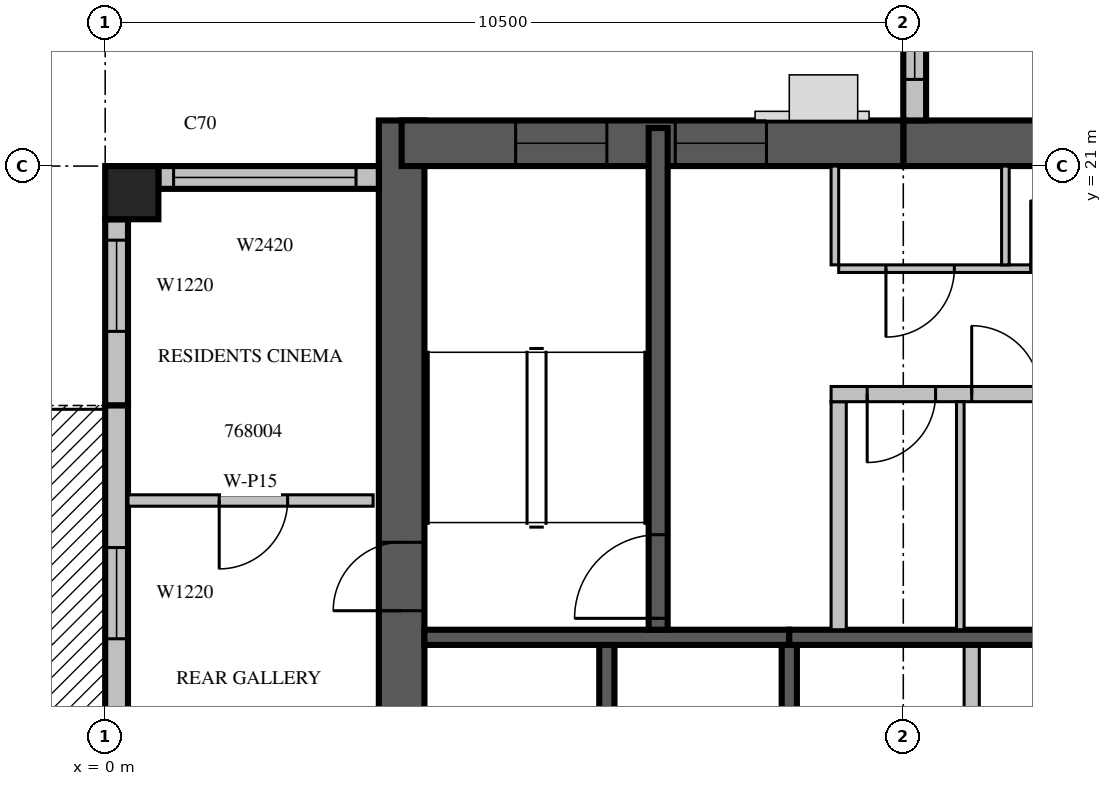
"""IFC4 building model, lengths in metres.
Left out: names, types, materials, properties, quantities, classifications, styles, units other than length and angle.
Written with IfcOpenShell. Run it as: python <this file> out.ifc"""

import sys

from ifc_helpers import new_model, si_unit, direction, frame, frame_2d, origin, origin_2d, place, context, subcontext, project, spatial, rectangle, extrude, source, transform, mapped, element, fill, save


model = new_model("IFC4")
c1 = context("Model", 3, precision=1e-05, world=origin(), true_north=direction((0.0, 1.0)))
c2 = subcontext(c1, "Body", "Model", "MODEL_VIEW")
j1 = project(units=[si_unit("LENGTHUNIT", "METRE"), si_unit("PLANEANGLEUNIT", "RADIAN")], contexts=[c1])
p1 = place(None, origin())
s1 = spatial("IfcSite", under=j1, at=p1, CompositionType="ELEMENT")
p2 = place(p1, origin())
s2 = spatial("IfcBuilding", under=s1, at=p2, CompositionType="ELEMENT")
p3 = place(p2, frame((0.0, 0.0, 298.5)))
s3 = spatial("IfcBuildingStorey", under=s2, at=p3, CompositionType="ELEMENT", Elevation=298.5)
m1 = source(origin(), c2, "Body", "SweptSolid", [
    extrude(rectangle(XDim=0.7, YDim=0.7, at=origin_2d()), origin(), (0.0, 0.0, 1.0), 3.5),
])
p4 = place(p3, frame((0.35, 20.65, 0.0), z_axis=(0.0, 0.0, 1.0), x_axis=(1.0, 0.0, 0.0)))
e1 = element("IfcColumn", 1, at=p4, inside=s3, PredefinedType="COLUMN", context=c2, shape_type="MappedRepresentation", body=[
    mapped(m1, transform((0.0, 0.0, 0.0), scale=1.0)),
])
m2 = source(origin(), c2, "Body", "SweptSolid", [
    extrude(rectangle(XDim=17.4, YDim=0.6, at=frame_2d((8.7, 0.0))), origin(), (0.0, 0.0, 1.0), 3.5),
])
p5 = place(p3, frame((3.9, 4.2, 0.0), z_axis=(0.0, 0.0, 1.0), x_axis=(0.0, 1.0, 0.0)))
e2 = element("IfcWall", 2, at=p5, inside=s3, PredefinedType="SHEAR", context=c2, shape_type="MappedRepresentation", body=[
    mapped(m2, transform((0.0, 0.0, 0.0), scale=1.0)),
])
m3 = source(origin(), c2, "Body", "SweptSolid", [
    extrude(rectangle(XDim=2.2, YDim=2.1, at=frame_2d((1.1, 1.05))), frame((0.0, 0.31, 0.0), z_axis=(0.0, -1.0, 0.0), x_axis=(1.0, 0.0, 0.0)), (0.0, 0.0, 1.0), 0.62),
])
p6 = place(p5, frame((4.2, 0.0, 0.0)))
e3 = element("IfcOpeningElement", 3, at=p6, cuts=e2, PredefinedType="OPENING", context=c2, shape_type="MappedRepresentation", body=[
    mapped(m3, transform((0.0, 0.0, 0.0), scale=1.0)),
])
m4 = source(origin(), c2, "Body", "SweptSolid", [
    extrude(rectangle(XDim=0.9, YDim=2.1, at=frame_2d((0.45, 1.05))), frame((0.0, 0.31, 0.0), z_axis=(0.0, -1.0, 0.0), x_axis=(1.0, 0.0, 0.0)), (0.0, 0.0, 1.0), 0.62),
])
p7 = place(p5, frame((10.95, 0.0, 0.0)))
e4 = element("IfcOpeningElement", 4, at=p7, cuts=e2, PredefinedType="OPENING", context=c2, shape_type="MappedRepresentation", body=[
    mapped(m4, transform((0.0, 0.0, 0.0), scale=1.0)),
])
m5 = source(origin(), c2, "Body", "SweptSolid", [
    extrude(rectangle(XDim=11.1, YDim=0.6, at=frame_2d((5.55, 0.0))), origin(), (0.0, 0.0, 1.0), 3.5),
])
p8 = place(p3, frame((10.5, 21.3, 0.0), z_axis=(0.0, 0.0, 1.0), x_axis=(1.0, 0.0, 0.0)))
e5 = element("IfcWall", 5, at=p8, inside=s3, PredefinedType="SHEAR", context=c2, shape_type="MappedRepresentation", body=[
    mapped(m5, transform((0.0, 0.0, 0.0), scale=1.0)),
])
m6 = source(origin(), c2, "Body", "SweptSolid", [
    extrude(rectangle(XDim=1.2, YDim=2.1, at=frame_2d((0.6, 1.05))), frame((0.0, 0.31, 0.0), z_axis=(0.0, -1.0, 0.0), x_axis=(1.0, 0.0, 0.0)), (0.0, 0.0, 1.0), 0.62),
])
p9 = place(p8, frame((8.7, 0.0, 0.0)))
e6 = element("IfcOpeningElement", 6, at=p9, cuts=e5, PredefinedType="OPENING", context=c2, shape_type="MappedRepresentation", body=[
    mapped(m6, transform((0.0, 0.0, 0.0), scale=1.0)),
])
m7 = source(origin(), c2, "Body", "SweptSolid", [
    extrude(rectangle(XDim=6.6, YDim=0.6, at=frame_2d((3.3, 0.0))), origin(), (0.0, 0.0, 1.0), 3.5),
])
p10 = place(p3, frame((3.9, 21.3, 0.0), z_axis=(0.0, 0.0, 1.0), x_axis=(1.0, 0.0, 0.0)))
e7 = element("IfcWall", 7, at=p10, inside=s3, PredefinedType="SHEAR", context=c2, shape_type="MappedRepresentation", body=[
    mapped(m7, transform((0.0, 0.0, 0.0), scale=1.0)),
])
m8 = source(origin(), c2, "Body", "SweptSolid", [
    extrude(rectangle(XDim=1.2, YDim=2.4, at=frame_2d((0.6, 1.2))), frame((0.0, 0.31, 0.0), z_axis=(0.0, -1.0, 0.0), x_axis=(1.0, 0.0, 0.0)), (0.0, 0.0, 1.0), 0.62),
])
p11 = place(p10, frame((1.5, 0.0, 0.6)))
e8 = element("IfcOpeningElement", 8, at=p11, cuts=e7, PredefinedType="OPENING", context=c2, shape_type="MappedRepresentation", body=[
    mapped(m8, transform((0.0, 0.0, 0.0), scale=1.0)),
])
p12 = place(p10, frame((3.6, 0.0, 0.6)))
e9 = element("IfcOpeningElement", 9, at=p12, cuts=e7, PredefinedType="OPENING", context=c2, shape_type="MappedRepresentation", body=[
    mapped(m8, transform((0.0, 0.0, 0.0), scale=1.0)),
])
m9 = source(origin(), c2, "Body", "SweptSolid", [
    extrude(rectangle(XDim=5.28, YDim=0.3, at=frame_2d((2.64, 0.0))), origin(), (0.0, 0.0, 1.0), 3.1),
])
p13 = place(p3, frame((10.65, 26.88, 0.0), z_axis=(0.0, 0.0, 1.0), x_axis=(0.0, -1.0, 0.0)))
e10 = element("IfcWall", 10, at=p13, inside=s3, PredefinedType="STANDARD", context=c2, shape_type="MappedRepresentation", body=[
    mapped(m9, transform((0.0, 0.0, 0.0), scale=1.0)),
])
m10 = source(origin(), c2, "Body", "SweptSolid", [
    extrude(rectangle(XDim=3.6, YDim=2.0, at=frame_2d((1.8, 1.0))), frame((0.0, 0.16, 0.0), z_axis=(0.0, -1.0, 0.0), x_axis=(1.0, 0.0, 0.0)), (0.0, 0.0, 1.0), 0.32),
])
p14 = place(p13, frame((1.14, 0.0, 0.6)))
e11 = element("IfcOpeningElement", 11, at=p14, cuts=e10, PredefinedType="OPENING", context=c2, shape_type="MappedRepresentation", body=[
    mapped(m10, transform((0.0, 0.0, 0.0), scale=1.0)),
])
m11 = source(origin(), c2, "Body", "SweptSolid", [
    extrude(rectangle(XDim=2.9, YDim=0.3, at=frame_2d((1.45, 0.0))), origin(), (0.0, 0.0, 1.0), 3.1),
])
p15 = place(p3, frame((3.6, 20.85, 0.0), z_axis=(0.0, 0.0, 1.0), x_axis=(-1.0, 0.0, 0.0)))
e12 = element("IfcWall", 12, at=p15, inside=s3, PredefinedType="STANDARD", context=c2, shape_type="MappedRepresentation", body=[
    mapped(m11, transform((0.0, 0.0, 0.0), scale=1.0)),
])
m12 = source(origin(), c2, "Body", "SweptSolid", [
    extrude(rectangle(XDim=2.4, YDim=2.0, at=frame_2d((1.2, 1.0))), frame((0.0, 0.16, 0.0), z_axis=(0.0, -1.0, 0.0), x_axis=(1.0, 0.0, 0.0)), (0.0, 0.0, 1.0), 0.32),
])
p16 = place(p15, frame((0.3, 0.0, 0.6)))
e13 = element("IfcOpeningElement", 13, at=p16, cuts=e12, PredefinedType="OPENING", context=c2, shape_type="MappedRepresentation", body=[
    mapped(m12, transform((0.0, 0.0, 0.0), scale=1.0)),
])
m13 = source(origin(), c2, "Body", "SweptSolid", [
    extrude(rectangle(XDim=2.45, YDim=0.3, at=frame_2d((1.225, 0.0))), origin(), (0.0, 0.0, 1.0), 3.1),
])
p17 = place(p3, frame((0.15, 20.3, 0.0), z_axis=(0.0, 0.0, 1.0), x_axis=(0.0, -1.0, 0.0)))
e14 = element("IfcWall", 14, at=p17, inside=s3, PredefinedType="STANDARD", context=c2, shape_type="MappedRepresentation", body=[
    mapped(m13, transform((0.0, 0.0, 0.0), scale=1.0)),
])
m14 = source(origin(), c2, "Body", "SweptSolid", [
    extrude(rectangle(XDim=1.2, YDim=2.0, at=frame_2d((0.6, 1.0))), frame((0.0, 0.16, 0.0), z_axis=(0.0, -1.0, 0.0), x_axis=(1.0, 0.0, 0.0)), (0.0, 0.0, 1.0), 0.32),
])
p18 = place(p17, frame((0.275, 0.0, 0.6)))
e15 = element("IfcOpeningElement", 15, at=p18, cuts=e14, PredefinedType="OPENING", context=c2, shape_type="MappedRepresentation", body=[
    mapped(m14, transform((0.0, 0.0, 0.0), scale=1.0)),
])
m15 = source(origin(), c2, "Body", "SweptSolid", [
    extrude(rectangle(XDim=7.0, YDim=0.3, at=frame_2d((3.5, 0.0))), origin(), (0.0, 0.0, 1.0), 3.1),
])
p19 = place(p3, frame((0.15, 17.85, 0.0), z_axis=(0.0, 0.0, 1.0), x_axis=(0.0, -1.0, 0.0)))
e16 = element("IfcWall", 16, at=p19, inside=s3, PredefinedType="STANDARD", context=c2, shape_type="MappedRepresentation", body=[
    mapped(m15, transform((0.0, 0.0, 0.0), scale=1.0)),
])
m16 = source(origin(), c2, "Body", "SweptSolid", [
    extrude(rectangle(XDim=1.8, YDim=2.4, at=frame_2d((0.9, 1.2))), frame((0.0, 0.16, 0.0), z_axis=(0.0, -1.0, 0.0), x_axis=(1.0, 0.0, 0.0)), (0.0, 0.0, 1.0), 0.32),
])
p20 = place(p19, frame((4.725, 0.0, 0.0)))
e17 = element("IfcOpeningElement", 17, at=p20, cuts=e16, PredefinedType="OPENING", context=c2, shape_type="MappedRepresentation", body=[
    mapped(m16, transform((0.0, 0.0, 0.0), scale=1.0)),
])
p21 = place(p19, frame((1.869, 0.0, 0.6)))
e18 = element("IfcOpeningElement", 18, at=p21, cuts=e16, PredefinedType="OPENING", context=c2, shape_type="MappedRepresentation", body=[
    mapped(m14, transform((0.0, 0.0, 0.0), scale=1.0)),
])
m17 = source(origin(), c2, "Body", "SweptSolid", [
    extrude(rectangle(XDim=3.0, YDim=0.2, at=frame_2d((1.5, 0.0))), origin(), (0.0, 0.0, 1.0), 3.5),
])
p22 = place(p3, frame((6.6, 11.7, 0.0), z_axis=(0.0, 0.0, 1.0), x_axis=(0.0, 1.0, 0.0)))
e19 = element("IfcWall", 19, at=p22, inside=s3, PredefinedType="SOLIDWALL", context=c2, shape_type="MappedRepresentation", body=[
    mapped(m17, transform((0.0, 0.0, 0.0), scale=1.0)),
])
m18 = source(origin(), c2, "Body", "SweptSolid", [
    extrude(rectangle(XDim=3.0, YDim=0.2, at=frame_2d((1.5, 0.0))), origin(), (0.0, 0.0, 1.0), 3.1),
])
p23 = place(p3, frame((9.0, 11.7, 0.0), z_axis=(0.0, 0.0, 1.0), x_axis=(0.0, 1.0, 0.0)))
e20 = element("IfcWall", 20, at=p23, inside=s3, PredefinedType="SOLIDWALL", context=c2, shape_type="MappedRepresentation", body=[
    mapped(m18, transform((0.0, 0.0, 0.0), scale=1.0)),
])
m19 = source(origin(), c2, "Body", "SweptSolid", [
    extrude(rectangle(XDim=3.0, YDim=0.2, at=frame_2d((1.5, 0.0))), origin(), (0.0, 0.0, 1.0), 3.1),
])
p24 = place(p3, frame((11.4, 11.7, 0.0), z_axis=(0.0, 0.0, 1.0), x_axis=(0.0, 1.0, 0.0)))
e21 = element("IfcWall", 21, at=p24, inside=s3, PredefinedType="PARTITIONING", context=c2, shape_type="MappedRepresentation", body=[
    mapped(m19, transform((0.0, 0.0, 0.0), scale=1.0)),
])
m20 = source(origin(), c2, "Body", "SweptSolid", [
    extrude(rectangle(XDim=4.8, YDim=0.2, at=frame_2d((2.4, 0.0))), origin(), (0.0, 0.0, 1.0), 3.5),
])
p25 = place(p3, frame((4.2, 14.8, 0.0), z_axis=(0.0, 0.0, 1.0), x_axis=(1.0, 0.0, 0.0)))
e22 = element("IfcWall", 22, at=p25, inside=s3, PredefinedType="SOLIDWALL", context=c2, shape_type="MappedRepresentation", body=[
    mapped(m20, transform((0.0, 0.0, 0.0), scale=1.0)),
])
m21 = source(origin(), c2, "Body", "SweptSolid", [
    extrude(rectangle(XDim=4.8, YDim=0.2, at=frame_2d((2.4, 0.0))), origin(), (0.0, 0.0, 1.0), 3.1),
])
p26 = place(p3, frame((9.0, 14.8, 0.0), z_axis=(0.0, 0.0, 1.0), x_axis=(1.0, 0.0, 0.0)))
e23 = element("IfcWall", 23, at=p26, inside=s3, PredefinedType="SOLIDWALL", context=c2, shape_type="MappedRepresentation", body=[
    mapped(m21, transform((0.0, 0.0, 0.0), scale=1.0)),
])
m22 = source(origin(), c2, "Body", "SweptSolid", [
    extrude(rectangle(XDim=6.6, YDim=0.25, at=frame_2d((3.3, 0.0))), origin(), (0.0, 0.0, 1.0), 3.1),
])
p27 = place(p3, frame((7.275, 14.9, 0.0), z_axis=(0.0, 0.0, 1.0), x_axis=(0.0, 1.0, 0.0)))
e24 = element("IfcWall", 24, at=p27, inside=s3, PredefinedType="SOLIDWALL", context=c2, shape_type="MappedRepresentation", body=[
    mapped(m22, transform((0.0, 0.0, 0.0), scale=1.0)),
])
m23 = source(origin(), c2, "Body", "SweptSolid", [
    extrude(rectangle(XDim=1.1, YDim=2.1, at=frame_2d((0.55, 1.05))), frame((0.0, 0.135, 0.0), z_axis=(0.0, -1.0, 0.0), x_axis=(1.0, 0.0, 0.0)), (0.0, 0.0, 1.0), 0.27),
])
p28 = place(p27, frame((0.15, 0.0, 0.0)))
e25 = element("IfcOpeningElement", 25, at=p28, cuts=e24, PredefinedType="OPENING", context=c2, shape_type="MappedRepresentation", body=[
    mapped(m23, transform((0.0, 0.0, 0.0), scale=1.0)),
])
p29 = place(p3, frame((9.65, 14.9, 0.0), z_axis=(0.0, 0.0, 1.0), x_axis=(0.0, 1.0, 0.0)))
e26 = element("IfcWall", 26, at=p29, inside=s3, PredefinedType="PARTITIONING", context=c2, shape_type="MappedRepresentation", body=[
    mapped(m19, transform((0.0, 0.0, 0.0), scale=1.0)),
])
m24 = source(origin(), c2, "Body", "SweptSolid", [
    extrude(rectangle(XDim=11.45, YDim=0.2, at=frame_2d((5.725, 0.0))), origin(), (0.0, 0.0, 1.0), 3.1),
])
p30 = place(p3, frame((9.55, 18.0, 0.0), z_axis=(0.0, 0.0, 1.0), x_axis=(1.0, 0.0, 0.0)))
e27 = element("IfcWall", 27, at=p30, inside=s3, PredefinedType="PARTITIONING", context=c2, shape_type="MappedRepresentation", body=[
    mapped(m24, transform((0.0, 0.0, 0.0), scale=1.0)),
])
m25 = source(origin(), c2, "Body", "SweptSolid", [
    extrude(rectangle(XDim=0.9, YDim=2.1, at=frame_2d((0.45, 1.05))), frame((0.0, 0.11, 0.0), z_axis=(0.0, -1.0, 0.0), x_axis=(1.0, 0.0, 0.0)), (0.0, 0.0, 1.0), 0.22),
])
p31 = place(p30, frame((0.475, 0.0, 0.0)))
e28 = element("IfcOpeningElement", 28, at=p31, cuts=e27, PredefinedType="OPENING", context=c2, shape_type="MappedRepresentation", body=[
    mapped(m25, transform((0.0, 0.0, 0.0), scale=1.0)),
])
p32 = place(p30, frame((1.85, 0.0, 0.0)))
e29 = element("IfcOpeningElement", 29, at=p32, cuts=e27, PredefinedType="OPENING", context=c2, shape_type="MappedRepresentation", body=[
    mapped(m25, transform((0.0, 0.0, 0.0), scale=1.0)),
])
p33 = place(p30, frame((3.125, 0.0, 0.0)))
e30 = element("IfcOpeningElement", 30, at=p33, cuts=e27, PredefinedType="OPENING", context=c2, shape_type="MappedRepresentation", body=[
    mapped(m25, transform((0.0, 0.0, 0.0), scale=1.0)),
])
m26 = source(origin(), c2, "Body", "SweptSolid", [
    extrude(rectangle(XDim=1.1, YDim=2.1, at=frame_2d((0.55, 1.05))), frame((0.0, 0.11, 0.0), z_axis=(0.0, -1.0, 0.0), x_axis=(1.0, 0.0, 0.0)), (0.0, 0.0, 1.0), 0.22),
])
p34 = place(p30, frame((7.35, 0.0, 0.0)))
e31 = element("IfcOpeningElement", 31, at=p34, cuts=e27, PredefinedType="OPENING", context=c2, shape_type="MappedRepresentation", body=[
    mapped(m26, transform((0.0, 0.0, 0.0), scale=1.0)),
])
m27 = source(origin(), c2, "Body", "SweptSolid", [
    extrude(rectangle(XDim=9.4, YDim=0.1, at=frame_2d((4.7, 0.0))), origin(), (0.0, 0.0, 1.0), 3.1),
])
p35 = place(p3, frame((9.65, 19.65, 0.0), z_axis=(0.0, 0.0, 1.0), x_axis=(1.0, 0.0, 0.0)))
e32 = element("IfcWall", 32, at=p35, inside=s3, PredefinedType="PARTITIONING", context=c2, shape_type="MappedRepresentation", body=[
    mapped(m27, transform((0.0, 0.0, 0.0), scale=1.0)),
])
m28 = source(origin(), c2, "Body", "SweptSolid", [
    extrude(rectangle(XDim=0.9, YDim=2.1, at=frame_2d((0.45, 1.05))), frame((0.0, 0.06, 0.0), z_axis=(0.0, -1.0, 0.0), x_axis=(1.0, 0.0, 0.0)), (0.0, 0.0, 1.0), 0.12),
])
p36 = place(p35, frame((0.622, 0.0, 0.0)))
e33 = element("IfcOpeningElement", 33, at=p36, cuts=e32, PredefinedType="OPENING", context=c2, shape_type="MappedRepresentation", body=[
    mapped(m28, transform((0.0, 0.0, 0.0), scale=1.0)),
])
p37 = place(p35, frame((2.527, 0.0, 0.0)))
e34 = element("IfcOpeningElement", 34, at=p37, cuts=e32, PredefinedType="OPENING", context=c2, shape_type="MappedRepresentation", body=[
    mapped(m28, transform((0.0, 0.0, 0.0), scale=1.0)),
])
p38 = place(p35, frame((4.172, 0.0, 0.0)))
e35 = element("IfcOpeningElement", 35, at=p38, cuts=e32, PredefinedType="OPENING", context=c2, shape_type="MappedRepresentation", body=[
    mapped(m28, transform((0.0, 0.0, 0.0), scale=1.0)),
])
p39 = place(p35, frame((6.208, 0.0, 0.0)))
e36 = element("IfcOpeningElement", 36, at=p39, cuts=e32, PredefinedType="OPENING", context=c2, shape_type="MappedRepresentation", body=[
    mapped(m28, transform((0.0, 0.0, 0.0), scale=1.0)),
])
p40 = place(p35, frame((8.192, 0.0, 0.0)))
e37 = element("IfcOpeningElement", 37, at=p40, cuts=e32, PredefinedType="OPENING", context=c2, shape_type="MappedRepresentation", body=[
    mapped(m28, transform((0.0, 0.0, 0.0), scale=1.0)),
])
m29 = source(origin(), c2, "Body", "SweptSolid", [
    extrude(rectangle(XDim=1.3, YDim=0.1, at=frame_2d((0.65, 0.0))), origin(), (0.0, 0.0, 1.0), 3.1),
])
for number, where, z_axis, x_axis in (
    (38, (11.843, 19.7, 0.0), (0.0, 0.0, 1.0), (0.0, 1.0, 0.0)),
    (39, (9.6, 19.7, 0.0), (0.0, 0.0, 1.0), (0.0, 1.0, 0.0)),
):
    element("IfcWall", number, at=place(p3, frame(where, z_axis=z_axis, x_axis=x_axis)), inside=s3, PredefinedType="PARTITIONING", context=c2, shape_type="MappedRepresentation", body=[
        mapped(m29, transform((0.0, 0.0, 0.0), scale=1.0)),
    ])
m30 = source(origin(), c2, "Body", "SweptSolid", [
    extrude(rectangle(XDim=3.0, YDim=0.1, at=frame_2d((1.5, 0.0))), origin(), (0.0, 0.0, 1.0), 3.1),
])
p41 = place(p3, frame((11.25, 14.9, 0.0), z_axis=(0.0, 0.0, 1.0), x_axis=(0.0, 1.0, 0.0)))
e40 = element("IfcWall", 40, at=p41, inside=s3, PredefinedType="PARTITIONING", context=c2, shape_type="MappedRepresentation", body=[
    mapped(m30, transform((0.0, 0.0, 0.0), scale=1.0)),
])
m31 = source(origin(), c2, "Body", "SweptSolid", [
    extrude(rectangle(XDim=3.225, YDim=0.15, at=frame_2d((1.613, 0.0))), origin(), (0.0, 0.0, 1.0), 3.1),
])
p42 = place(p3, frame((0.3, 16.6, 0.0), z_axis=(0.0, 0.0, 1.0), x_axis=(1.0, 0.0, 0.0)))
e41 = element("IfcWall", 41, at=p42, inside=s3, PredefinedType="PARTITIONING", context=c2, shape_type="MappedRepresentation", body=[
    mapped(m31, transform((0.0, 0.0, 0.0), scale=1.0)),
])
m32 = source(origin(), c2, "Body", "SweptSolid", [
    extrude(rectangle(XDim=0.9, YDim=2.1, at=frame_2d((0.45, 1.05))), frame((0.0, 0.085, 0.0), z_axis=(0.0, -1.0, 0.0), x_axis=(1.0, 0.0, 0.0)), (0.0, 0.0, 1.0), 0.17),
])
p43 = place(p42, frame((1.2, 0.0, 0.0)))
e42 = element("IfcOpeningElement", 42, at=p43, cuts=e41, PredefinedType="OPENING", context=c2, shape_type="MappedRepresentation", body=[
    mapped(m32, transform((0.0, 0.0, 0.0), scale=1.0)),
])
m33 = source(origin(), c2, "Body", "SweptSolid", [
    extrude(rectangle(XDim=3.6, YDim=2.0, at=frame_2d((1.8, 1.0))), frame((0.0, 0.03, 0.0), z_axis=(0.0, -1.0, 0.0), x_axis=(1.0, 0.0, 0.0)), (0.0, 0.0, 1.0), 0.06),
])
p44 = place(p14, origin())
e43 = element("IfcWindow", 43, at=p44, inside=s3, PartitioningType="SINGLE_PANEL", PredefinedType="WINDOW", context=c2, shape_type="MappedRepresentation", body=[
    mapped(m33, transform((0.0, 0.0, 0.0), scale=1.0)),
])
fill(e11, e43)
m34 = source(origin(), c2, "Body", "SweptSolid", [
    extrude(rectangle(XDim=2.4, YDim=2.0, at=frame_2d((1.2, 1.0))), frame((0.0, 0.03, 0.0), z_axis=(0.0, -1.0, 0.0), x_axis=(1.0, 0.0, 0.0)), (0.0, 0.0, 1.0), 0.06),
])
p45 = place(p16, origin())
e44 = element("IfcWindow", 44, at=p45, inside=s3, PartitioningType="SINGLE_PANEL", PredefinedType="WINDOW", context=c2, shape_type="MappedRepresentation", body=[
    mapped(m34, transform((0.0, 0.0, 0.0), scale=1.0)),
])
fill(e13, e44)
m35 = source(origin(), c2, "Body", "SweptSolid", [
    extrude(rectangle(XDim=1.2, YDim=2.0, at=frame_2d((0.6, 1.0))), frame((0.0, 0.03, 0.0), z_axis=(0.0, -1.0, 0.0), x_axis=(1.0, 0.0, 0.0)), (0.0, 0.0, 1.0), 0.06),
])
p46 = place(p18, origin())
e45 = element("IfcWindow", 45, at=p46, inside=s3, PartitioningType="SINGLE_PANEL", PredefinedType="WINDOW", context=c2, shape_type="MappedRepresentation", body=[
    mapped(m35, transform((0.0, 0.0, 0.0), scale=1.0)),
])
fill(e15, e45)
p47 = place(p21, origin())
e46 = element("IfcWindow", 46, at=p47, inside=s3, PartitioningType="SINGLE_PANEL", PredefinedType="WINDOW", context=c2, shape_type="MappedRepresentation", body=[
    mapped(m35, transform((0.0, 0.0, 0.0), scale=1.0)),
])
fill(e18, e46)
m36 = source(origin(), c2, "Body", "SweptSolid", [
    extrude(rectangle(XDim=1.1, YDim=2.1, at=frame_2d((0.55, 1.05))), frame((0.0, 0.025, 0.0), z_axis=(0.0, -1.0, 0.0), x_axis=(1.0, 0.0, 0.0)), (0.0, 0.0, 1.0), 0.05),
])
p48 = place(p28, origin())
e47 = element("IfcDoor", 47, at=p48, inside=s3, OperationType="SINGLE_SWING_LEFT", PredefinedType="DOOR", context=c2, shape_type="MappedRepresentation", body=[
    mapped(m36, transform((0.0, 0.0, 0.0), scale=1.0)),
])
fill(e25, e47)
m37 = source(origin(), c2, "Body", "SweptSolid", [
    extrude(rectangle(XDim=0.9, YDim=2.1, at=frame_2d((0.45, 1.05))), frame((0.0, 0.025, 0.0), z_axis=(0.0, -1.0, 0.0), x_axis=(1.0, 0.0, 0.0)), (0.0, 0.0, 1.0), 0.05),
])
p49 = place(p31, origin())
e48 = element("IfcDoor", 48, at=p49, inside=s3, OperationType="SINGLE_SWING_RIGHT", PredefinedType="DOOR", context=c2, shape_type="MappedRepresentation", body=[
    mapped(m37, transform((0.0, 0.0, 0.0), scale=1.0)),
])
fill(e28, e48)
p50 = place(p32, origin())
e49 = element("IfcDoor", 49, at=p50, inside=s3, OperationType="SINGLE_SWING_LEFT", PredefinedType="DOOR", context=c2, shape_type="MappedRepresentation", body=[
    mapped(m37, transform((0.0, 0.0, 0.0), scale=1.0)),
])
fill(e29, e49)
p51 = place(p36, origin())
e50 = element("IfcDoor", 50, at=p51, inside=s3, OperationType="SINGLE_SWING_RIGHT", PredefinedType="DOOR", context=c2, shape_type="MappedRepresentation", body=[
    mapped(m37, transform((0.0, 0.0, 0.0), scale=1.0)),
])
fill(e33, e50)
p52 = place(p37, origin())
e51 = element("IfcDoor", 51, at=p52, inside=s3, OperationType="SINGLE_SWING_LEFT", PredefinedType="DOOR", context=c2, shape_type="MappedRepresentation", body=[
    mapped(m37, transform((0.0, 0.0, 0.0), scale=1.0)),
])
fill(e34, e51)
p53 = place(p7, origin())
e52 = element("IfcDoor", 52, at=p53, inside=s3, OperationType="SINGLE_SWING_LEFT", PredefinedType="DOOR", context=c2, shape_type="MappedRepresentation", body=[
    mapped(m37, transform((0.0, 0.0, 0.0), scale=1.0)),
])
fill(e4, e52)
m38 = source(origin(), c2, "Body", "SweptSolid", [
    extrude(rectangle(XDim=1.2, YDim=2.4, at=frame_2d((0.6, 1.2))), frame((0.0, 0.03, 0.0), z_axis=(0.0, -1.0, 0.0), x_axis=(1.0, 0.0, 0.0)), (0.0, 0.0, 1.0), 0.06),
])
p54 = place(p11, origin())
e53 = element("IfcWindow", 53, at=p54, inside=s3, PartitioningType="SINGLE_PANEL", PredefinedType="WINDOW", context=c2, shape_type="MappedRepresentation", body=[
    mapped(m38, transform((0.0, 0.0, 0.0), scale=1.0)),
])
fill(e8, e53)
p55 = place(p12, origin())
e54 = element("IfcWindow", 54, at=p55, inside=s3, PartitioningType="SINGLE_PANEL", PredefinedType="WINDOW", context=c2, shape_type="MappedRepresentation", body=[
    mapped(m38, transform((0.0, 0.0, 0.0), scale=1.0)),
])
fill(e9, e54)
p56 = place(p43, origin())
e55 = element("IfcDoor", 55, at=p56, inside=s3, OperationType="SINGLE_SWING_RIGHT", PredefinedType="DOOR", context=c2, shape_type="MappedRepresentation", body=[
    mapped(m37, transform((0.0, 0.0, 0.0), scale=1.0)),
])
fill(e42, e55)
save(model, sys.argv[1])
